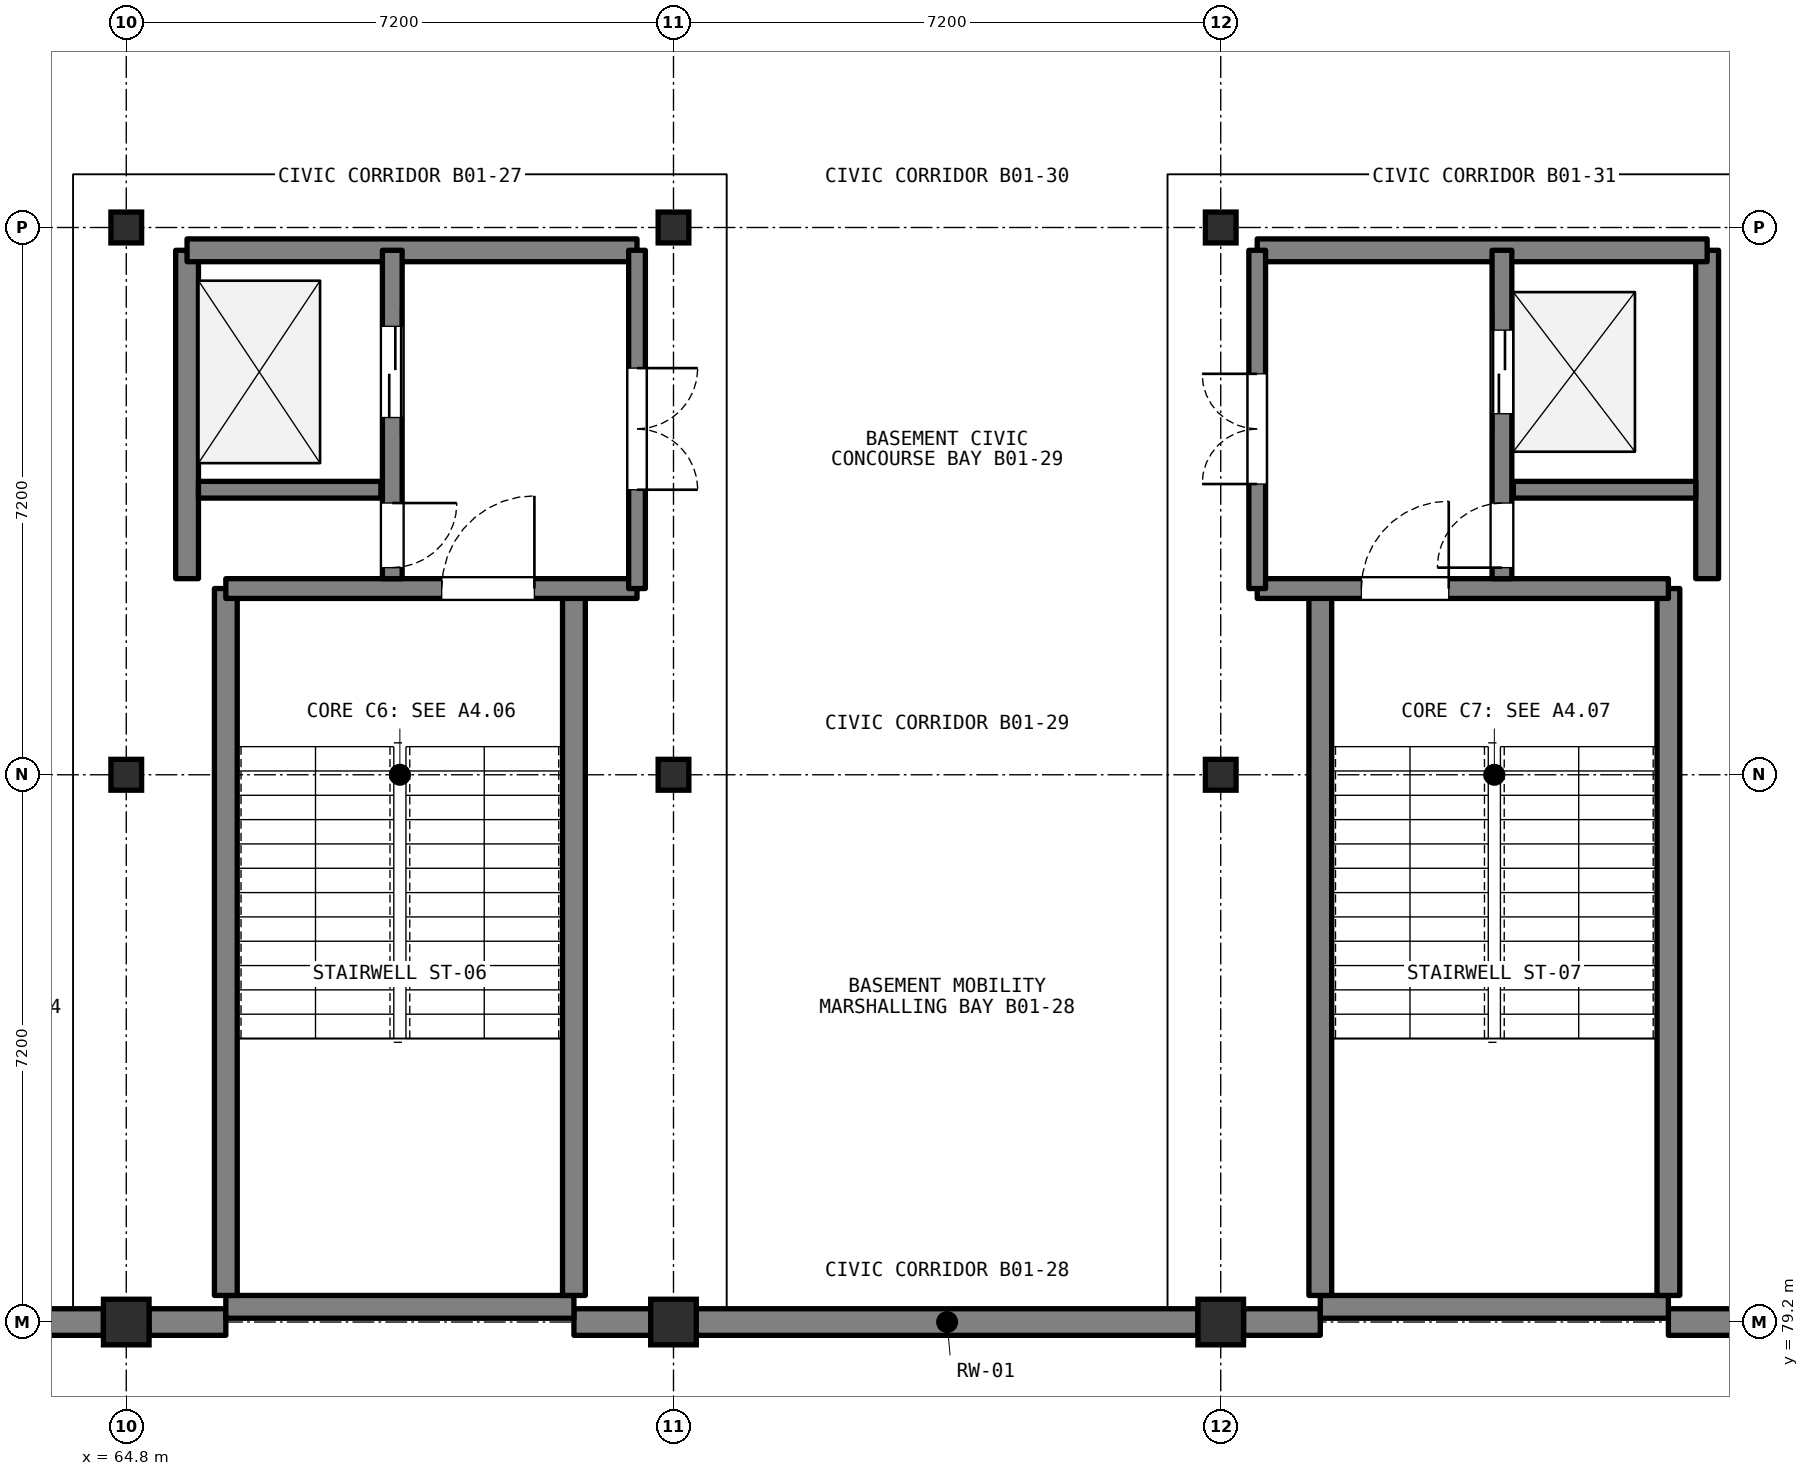
"""IFC4 building model, lengths in metres.
Left out: names, types, materials, properties, quantities, classifications, styles, units other than length and angle.
Written with IfcOpenShell. Run it as: python <this file> out.ifc"""

import sys

from ifc_helpers import new_model, si_unit, direction, frame, frame_2d, origin, origin_2d, place, context, subcontext, project, spatial, rectangle, i_section, extrude, element, fill, save


model = new_model("IFC4")
c1 = context("Model", 3, precision=1e-05, world=origin(), true_north=direction((0.0, 1.0)))
c2 = subcontext(c1, "Body", "Model", "MODEL_VIEW")
j1 = project(units=[si_unit("LENGTHUNIT", "METRE"), si_unit("PLANEANGLEUNIT", "RADIAN")], contexts=[c1])
p1 = place(None, origin())
s1 = spatial("IfcSite", under=j1, at=p1, CompositionType="ELEMENT")
p2 = place(p1, origin())
s2 = spatial("IfcBuilding", under=s1, at=p2, CompositionType="ELEMENT")
p3 = place(p2, frame((0.0, 0.0, -4.2)))
s3 = spatial("IfcBuildingStorey", under=s2, at=p3, CompositionType="ELEMENT", Elevation=-4.2)
p4 = place(p3, frame((57.9, 79.2, 0.0), z_axis=(0.0, 0.0, 1.0), x_axis=(1.0, 0.0, 0.0)))
e1 = element("IfcWall", 1, at=p4, inside=s3, PredefinedType="USERDEFINED", context=c2, shape_type="SweptSolid", body=[
    extrude(rectangle(XDim=6.6, YDim=0.35, at=frame_2d((3.3, 0.0))), origin(), (0.0, 0.0, 1.0), 3.98),
])
for number, where, z_axis, x_axis in (
    (2, (65.1, 79.2, 0.0), (0.0, 0.0, 1.0), (1.0, 0.0, 0.0)),
    (3, (70.69, 79.2, 0.0), (0.0, 0.0, 1.0), (1.0, 0.0, 0.0)),
):
    element("IfcWall", number, at=place(p3, frame(where, z_axis=z_axis, x_axis=x_axis)), inside=s3, PredefinedType="USERDEFINED", context=c2, shape_type="SweptSolid", body=[
        extrude(rectangle(XDim=1.01, YDim=0.35, at=frame_2d((0.505, 0.0))), origin(), (0.0, 0.0, 1.0), 3.98),
    ])
p5 = place(p3, frame((72.3, 79.2, 0.0), z_axis=(0.0, 0.0, 1.0), x_axis=(1.0, 0.0, 0.0)))
e4 = element("IfcWall", 4, at=p5, inside=s3, PredefinedType="USERDEFINED", context=c2, shape_type="SweptSolid", body=[
    extrude(rectangle(XDim=6.6, YDim=0.35, at=frame_2d((3.3, 0.0))), origin(), (0.0, 0.0, 1.0), 3.98),
])
for number, where, z_axis, x_axis in (
    (5, (79.5, 79.2, 0.0), (0.0, 0.0, 1.0), (1.0, 0.0, 0.0)),
    (6, (85.09, 79.2, 0.0), (0.0, 0.0, 1.0), (1.0, 0.0, 0.0)),
):
    element("IfcWall", number, at=place(p3, frame(where, z_axis=z_axis, x_axis=x_axis)), inside=s3, PredefinedType="USERDEFINED", context=c2, shape_type="SweptSolid", body=[
        extrude(rectangle(XDim=1.01, YDim=0.35, at=frame_2d((0.505, 0.0))), origin(), (0.0, 0.0, 1.0), 3.98),
    ])
p6 = place(p3, frame((64.8, 79.2, 0.0), z_axis=(0.0, 0.0, 1.0), x_axis=(1.0, 0.0, 0.0)))
e7 = element("IfcColumn", 7, at=p6, inside=s3, PredefinedType="COLUMN", context=c2, shape_type="SweptSolid", body=[
    extrude(rectangle(XDim=0.6, YDim=0.6, at=origin_2d()), origin(), (0.0, 0.0, 1.0), 4.2),
])
for number, where, z_axis, x_axis in (
    (8, (64.8, 86.4, 0.0), (0.0, 0.0, 1.0), (1.0, 0.0, 0.0)),
    (9, (64.8, 93.6, 0.0), (0.0, 0.0, 1.0), (1.0, 0.0, 0.0)),
):
    element("IfcColumn", number, at=place(p3, frame(where, z_axis=z_axis, x_axis=x_axis)), inside=s3, PredefinedType="COLUMN", context=c2, shape_type="SweptSolid", body=[
        extrude(i_section(OverallWidth=0.404, OverallDepth=0.406, WebThickness=0.027, FlangeThickness=0.044, FilletRadius=0.015, at=origin_2d()), origin(), (0.0, 0.0, 1.0), 4.2),
    ])
p7 = place(p3, frame((72.0, 79.2, 0.0), z_axis=(0.0, 0.0, 1.0), x_axis=(1.0, 0.0, 0.0)))
e10 = element("IfcColumn", 10, at=p7, inside=s3, PredefinedType="COLUMN", context=c2, shape_type="SweptSolid", body=[
    extrude(rectangle(XDim=0.6, YDim=0.6, at=origin_2d()), origin(), (0.0, 0.0, 1.0), 4.2),
])
for number, where, z_axis, x_axis in (
    (11, (72.0, 86.4, 0.0), (0.0, 0.0, 1.0), (1.0, 0.0, 0.0)),
    (12, (72.0, 93.6, 0.0), (0.0, 0.0, 1.0), (1.0, 0.0, 0.0)),
):
    element("IfcColumn", number, at=place(p3, frame(where, z_axis=z_axis, x_axis=x_axis)), inside=s3, PredefinedType="COLUMN", context=c2, shape_type="SweptSolid", body=[
        extrude(i_section(OverallWidth=0.404, OverallDepth=0.406, WebThickness=0.027, FlangeThickness=0.044, FilletRadius=0.015, at=origin_2d()), origin(), (0.0, 0.0, 1.0), 4.2),
    ])
p8 = place(p3, frame((79.2, 79.2, 0.0), z_axis=(0.0, 0.0, 1.0), x_axis=(1.0, 0.0, 0.0)))
e13 = element("IfcColumn", 13, at=p8, inside=s3, PredefinedType="COLUMN", context=c2, shape_type="SweptSolid", body=[
    extrude(rectangle(XDim=0.6, YDim=0.6, at=origin_2d()), origin(), (0.0, 0.0, 1.0), 4.2),
])
for number, where, z_axis, x_axis in (
    (14, (79.2, 86.4, 0.0), (0.0, 0.0, 1.0), (1.0, 0.0, 0.0)),
    (15, (79.2, 93.6, 0.0), (0.0, 0.0, 1.0), (1.0, 0.0, 0.0)),
):
    element("IfcColumn", number, at=place(p3, frame(where, z_axis=z_axis, x_axis=x_axis)), inside=s3, PredefinedType="COLUMN", context=c2, shape_type="SweptSolid", body=[
        extrude(i_section(OverallWidth=0.404, OverallDepth=0.406, WebThickness=0.027, FlangeThickness=0.044, FilletRadius=0.015, at=origin_2d()), origin(), (0.0, 0.0, 1.0), 4.2),
    ])
p9 = place(p3, frame((66.11, 79.4, 0.0), z_axis=(0.0, 0.0, 1.0), x_axis=(1.0, 0.0, 0.0)))
e16 = element("IfcWall", 16, at=p9, inside=s3, PredefinedType="SHEAR", context=c2, shape_type="SweptSolid", body=[
    extrude(rectangle(XDim=4.58, YDim=0.3, at=frame_2d((2.29, 0.0))), origin(), (0.0, 0.0, 1.0), 3.98),
])
for number, where, z_axis, x_axis in (
    (17, (66.11, 79.55, 0.0), (0.0, 0.0, 1.0), (0.0, 1.0, 0.0)),
    (18, (70.69, 79.55, 0.0), (0.0, 0.0, 1.0), (0.0, 1.0, 0.0)),
):
    element("IfcWall", number, at=place(p3, frame(where, z_axis=z_axis, x_axis=x_axis)), inside=s3, PredefinedType="SHEAR", context=c2, shape_type="SweptSolid", body=[
        extrude(rectangle(XDim=9.3, YDim=0.3, at=frame_2d((4.65, 0.0))), origin(), (0.0, 0.0, 1.0), 3.98),
    ])
p10 = place(p3, frame((66.11, 88.85, 0.0), z_axis=(0.0, 0.0, 1.0), x_axis=(1.0, 0.0, 0.0)))
e19 = element("IfcWall", 19, at=p10, inside=s3, PredefinedType="SHEAR", context=c2, shape_type="SweptSolid", body=[
    extrude(rectangle(XDim=5.41, YDim=0.26, at=frame_2d((2.705, 0.0))), origin(), (0.0, 0.0, 1.0), 3.98),
])
p11 = place(p10, frame((2.84, 0.0, 0.0)))
e20 = element("IfcOpeningElement", 20, at=p11, cuts=e19, PredefinedType="OPENING", context=c2, shape_type="SweptSolid", body=[
    extrude(rectangle(XDim=1.22, YDim=2.15, at=frame_2d((0.61, 1.075))), frame((0.0, 0.14, 0.0), z_axis=(0.0, -1.0, 0.0), x_axis=(1.0, 0.0, 0.0)), (0.0, 0.0, 1.0), 0.28),
])
p12 = place(p3, frame((65.6, 88.98, 0.0), z_axis=(0.0, 0.0, 1.0), x_axis=(0.0, 1.0, 0.0)))
e21 = element("IfcWall", 21, at=p12, inside=s3, PredefinedType="SHEAR", context=c2, shape_type="SweptSolid", body=[
    extrude(rectangle(XDim=4.32, YDim=0.3, at=frame_2d((2.16, 0.0))), origin(), (0.0, 0.0, 1.0), 3.98),
])
p13 = place(p3, frame((65.6, 93.3, 0.0), z_axis=(0.0, 0.0, 1.0), x_axis=(1.0, 0.0, 0.0)))
e22 = element("IfcWall", 22, at=p13, inside=s3, PredefinedType="SHEAR", context=c2, shape_type="SweptSolid", body=[
    extrude(rectangle(XDim=5.92, YDim=0.3, at=frame_2d((2.96, 0.0))), origin(), (0.0, 0.0, 1.0), 3.98),
])
p14 = place(p3, frame((65.75, 90.15, 0.0), z_axis=(0.0, 0.0, 1.0), x_axis=(1.0, 0.0, 0.0)))
e23 = element("IfcWall", 23, at=p14, inside=s3, PredefinedType="SHEAR", context=c2, shape_type="SweptSolid", body=[
    extrude(rectangle(XDim=2.4, YDim=0.22, at=frame_2d((1.2, 0.0))), origin(), (0.0, 0.0, 1.0), 3.98),
])
p15 = place(p3, frame((68.3, 93.3, 0.0), z_axis=(0.0, 0.0, 1.0), x_axis=(0.0, -1.0, 0.0)))
e24 = element("IfcWall", 24, at=p15, inside=s3, PredefinedType="SHEAR", context=c2, shape_type="SweptSolid", body=[
    extrude(rectangle(XDim=4.32, YDim=0.26, at=frame_2d((2.16, 0.0))), origin(), (0.0, 0.0, 1.0), 3.98),
])
p16 = place(p15, frame((1.0, 0.0, 0.0)))
e25 = element("IfcOpeningElement", 25, at=p16, cuts=e24, PredefinedType="OPENING", context=c2, shape_type="SweptSolid", body=[
    extrude(rectangle(XDim=1.2, YDim=2.15, at=frame_2d((0.6, 1.075))), frame((0.0, 0.14, 0.0), z_axis=(0.0, -1.0, 0.0), x_axis=(1.0, 0.0, 0.0)), (0.0, 0.0, 1.0), 0.28),
])
p17 = place(p15, frame((3.325, 0.0, 0.0)))
e26 = element("IfcOpeningElement", 26, at=p17, cuts=e24, PredefinedType="OPENING", context=c2, shape_type="SweptSolid", body=[
    extrude(rectangle(XDim=0.85, YDim=2.05, at=frame_2d((0.425, 1.025))), frame((0.0, 0.14, 0.0), z_axis=(0.0, -1.0, 0.0), x_axis=(1.0, 0.0, 0.0)), (0.0, 0.0, 1.0), 0.28),
])
p18 = place(p3, frame((71.52, 93.3, 0.0), z_axis=(0.0, 0.0, 1.0), x_axis=(0.0, -1.0, 0.0)))
e27 = element("IfcWall", 27, at=p18, inside=s3, PredefinedType="SHEAR", context=c2, shape_type="SweptSolid", body=[
    extrude(rectangle(XDim=4.45, YDim=0.22, at=frame_2d((2.225, 0.0))), origin(), (0.0, 0.0, 1.0), 3.98),
])
p19 = place(p18, frame((1.55, 0.0, 0.0)))
e28 = element("IfcOpeningElement", 28, at=p19, cuts=e27, PredefinedType="OPENING", context=c2, shape_type="SweptSolid", body=[
    extrude(rectangle(XDim=1.6, YDim=2.2, at=frame_2d((0.8, 1.1))), frame((0.0, 0.12, 0.0), z_axis=(0.0, -1.0, 0.0), x_axis=(1.0, 0.0, 0.0)), (0.0, 0.0, 1.0), 0.24),
])
p20 = place(p3, frame((80.51, 79.4, 0.0), z_axis=(0.0, 0.0, 1.0), x_axis=(1.0, 0.0, 0.0)))
e29 = element("IfcWall", 29, at=p20, inside=s3, PredefinedType="SHEAR", context=c2, shape_type="SweptSolid", body=[
    extrude(rectangle(XDim=4.58, YDim=0.3, at=frame_2d((2.29, 0.0))), origin(), (0.0, 0.0, 1.0), 3.98),
])
for number, where, z_axis, x_axis in (
    (30, (80.51, 79.55, 0.0), (0.0, 0.0, 1.0), (0.0, 1.0, 0.0)),
    (31, (85.09, 79.55, 0.0), (0.0, 0.0, 1.0), (0.0, 1.0, 0.0)),
):
    element("IfcWall", number, at=place(p3, frame(where, z_axis=z_axis, x_axis=x_axis)), inside=s3, PredefinedType="SHEAR", context=c2, shape_type="SweptSolid", body=[
        extrude(rectangle(XDim=9.3, YDim=0.3, at=frame_2d((4.65, 0.0))), origin(), (0.0, 0.0, 1.0), 3.98),
    ])
p21 = place(p3, frame((79.68, 88.85, 0.0), z_axis=(0.0, 0.0, 1.0), x_axis=(1.0, 0.0, 0.0)))
e32 = element("IfcWall", 32, at=p21, inside=s3, PredefinedType="SHEAR", context=c2, shape_type="SweptSolid", body=[
    extrude(rectangle(XDim=5.41, YDim=0.26, at=frame_2d((2.705, 0.0))), origin(), (0.0, 0.0, 1.0), 3.98),
])
p22 = place(p21, frame((1.37, 0.0, 0.0)))
e33 = element("IfcOpeningElement", 33, at=p22, cuts=e32, PredefinedType="OPENING", context=c2, shape_type="SweptSolid", body=[
    extrude(rectangle(XDim=1.15, YDim=2.15, at=frame_2d((0.575, 1.075))), frame((0.0, 0.14, 0.0), z_axis=(0.0, -1.0, 0.0), x_axis=(1.0, 0.0, 0.0)), (0.0, 0.0, 1.0), 0.28),
])
p23 = place(p3, frame((85.6, 88.98, 0.0), z_axis=(0.0, 0.0, 1.0), x_axis=(0.0, 1.0, 0.0)))
e34 = element("IfcWall", 34, at=p23, inside=s3, PredefinedType="SHEAR", context=c2, shape_type="SweptSolid", body=[
    extrude(rectangle(XDim=4.32, YDim=0.3, at=frame_2d((2.16, 0.0))), origin(), (0.0, 0.0, 1.0), 3.98),
])
p24 = place(p3, frame((79.68, 93.3, 0.0), z_axis=(0.0, 0.0, 1.0), x_axis=(1.0, 0.0, 0.0)))
e35 = element("IfcWall", 35, at=p24, inside=s3, PredefinedType="SHEAR", context=c2, shape_type="SweptSolid", body=[
    extrude(rectangle(XDim=5.92, YDim=0.3, at=frame_2d((2.96, 0.0))), origin(), (0.0, 0.0, 1.0), 3.98),
])
p25 = place(p3, frame((83.05, 90.15, 0.0), z_axis=(0.0, 0.0, 1.0), x_axis=(1.0, 0.0, 0.0)))
e36 = element("IfcWall", 36, at=p25, inside=s3, PredefinedType="SHEAR", context=c2, shape_type="SweptSolid", body=[
    extrude(rectangle(XDim=2.4, YDim=0.22, at=frame_2d((1.2, 0.0))), origin(), (0.0, 0.0, 1.0), 3.98),
])
p26 = place(p3, frame((82.9, 88.98, 0.0), z_axis=(0.0, 0.0, 1.0), x_axis=(0.0, 1.0, 0.0)))
e37 = element("IfcWall", 37, at=p26, inside=s3, PredefinedType="SHEAR", context=c2, shape_type="SweptSolid", body=[
    extrude(rectangle(XDim=4.32, YDim=0.26, at=frame_2d((2.16, 0.0))), origin(), (0.0, 0.0, 1.0), 3.98),
])
p27 = place(p26, frame((2.17, 0.0, 0.0)))
e38 = element("IfcOpeningElement", 38, at=p27, cuts=e37, PredefinedType="OPENING", context=c2, shape_type="SweptSolid", body=[
    extrude(rectangle(XDim=1.1, YDim=2.15, at=frame_2d((0.55, 1.075))), frame((0.0, 0.14, 0.0), z_axis=(0.0, -1.0, 0.0), x_axis=(1.0, 0.0, 0.0)), (0.0, 0.0, 1.0), 0.28),
])
p28 = place(p26, frame((0.145, 0.0, 0.0)))
e39 = element("IfcOpeningElement", 39, at=p28, cuts=e37, PredefinedType="OPENING", context=c2, shape_type="SweptSolid", body=[
    extrude(rectangle(XDim=0.85, YDim=2.05, at=frame_2d((0.425, 1.025))), frame((0.0, 0.14, 0.0), z_axis=(0.0, -1.0, 0.0), x_axis=(1.0, 0.0, 0.0)), (0.0, 0.0, 1.0), 0.28),
])
p29 = place(p3, frame((79.68, 88.85, 0.0), z_axis=(0.0, 0.0, 1.0), x_axis=(0.0, 1.0, 0.0)))
e40 = element("IfcWall", 40, at=p29, inside=s3, PredefinedType="SHEAR", context=c2, shape_type="SweptSolid", body=[
    extrude(rectangle(XDim=4.45, YDim=0.22, at=frame_2d((2.225, 0.0))), origin(), (0.0, 0.0, 1.0), 3.98),
])
p30 = place(p29, frame((1.375, 0.0, 0.0)))
e41 = element("IfcOpeningElement", 41, at=p30, cuts=e40, PredefinedType="OPENING", context=c2, shape_type="SweptSolid", body=[
    extrude(rectangle(XDim=1.45, YDim=2.2, at=frame_2d((0.725, 1.1))), frame((0.0, 0.12, 0.0), z_axis=(0.0, -1.0, 0.0), x_axis=(1.0, 0.0, 0.0)), (0.0, 0.0, 1.0), 0.24),
])
p31 = place(p11, origin())
e42 = element("IfcDoor", 42, at=p31, inside=s3, OperationType="SINGLE_SWING_RIGHT", PredefinedType="DOOR", context=c2, shape_type="SweptSolid", body=[
    extrude(rectangle(XDim=1.22, YDim=2.15, at=frame_2d((0.61, 1.075))), frame((0.0, 0.025, 0.0), z_axis=(0.0, -1.0, 0.0), x_axis=(1.0, 0.0, 0.0)), (0.0, 0.0, 1.0), 0.05),
])
fill(e20, e42)
p32 = place(p16, origin())
e43 = element("IfcDoor", 43, at=p32, inside=s3, OperationType="DOUBLE_DOOR_SLIDING", PredefinedType="DOOR", context=c2, shape_type="SweptSolid", body=[
    extrude(rectangle(XDim=1.2, YDim=2.15, at=frame_2d((0.6, 1.075))), frame((0.0, 0.025, 0.0), z_axis=(0.0, -1.0, 0.0), x_axis=(1.0, 0.0, 0.0)), (0.0, 0.0, 1.0), 0.05),
])
fill(e25, e43)
p33 = place(p17, origin())
e44 = element("IfcDoor", 44, at=p33, inside=s3, OperationType="SINGLE_SWING_LEFT", PredefinedType="DOOR", context=c2, shape_type="SweptSolid", body=[
    extrude(rectangle(XDim=0.85, YDim=2.05, at=frame_2d((0.425, 1.025))), frame((0.0, 0.025, 0.0), z_axis=(0.0, -1.0, 0.0), x_axis=(1.0, 0.0, 0.0)), (0.0, 0.0, 1.0), 0.05),
])
fill(e26, e44)
p34 = place(p19, origin())
e45 = element("IfcDoor", 45, at=p34, inside=s3, OperationType="DOUBLE_DOOR_SINGLE_SWING", PredefinedType="DOOR", context=c2, shape_type="SweptSolid", body=[
    extrude(rectangle(XDim=1.6, YDim=2.2, at=frame_2d((0.8, 1.1))), frame((0.0, 0.025, 0.0), z_axis=(0.0, -1.0, 0.0), x_axis=(1.0, 0.0, 0.0)), (0.0, 0.0, 1.0), 0.05),
])
fill(e28, e45)
p35 = place(p22, origin())
e46 = element("IfcDoor", 46, at=p35, inside=s3, OperationType="SINGLE_SWING_RIGHT", PredefinedType="DOOR", context=c2, shape_type="SweptSolid", body=[
    extrude(rectangle(XDim=1.15, YDim=2.15, at=frame_2d((0.575, 1.075))), frame((0.0, 0.025, 0.0), z_axis=(0.0, -1.0, 0.0), x_axis=(1.0, 0.0, 0.0)), (0.0, 0.0, 1.0), 0.05),
])
fill(e33, e46)
p36 = place(p27, origin())
e47 = element("IfcDoor", 47, at=p36, inside=s3, OperationType="DOUBLE_DOOR_SLIDING", PredefinedType="DOOR", context=c2, shape_type="SweptSolid", body=[
    extrude(rectangle(XDim=1.1, YDim=2.15, at=frame_2d((0.55, 1.075))), frame((0.0, 0.025, 0.0), z_axis=(0.0, -1.0, 0.0), x_axis=(1.0, 0.0, 0.0)), (0.0, 0.0, 1.0), 0.05),
])
fill(e38, e47)
p37 = place(p28, origin())
e48 = element("IfcDoor", 48, at=p37, inside=s3, OperationType="SINGLE_SWING_LEFT", PredefinedType="DOOR", context=c2, shape_type="SweptSolid", body=[
    extrude(rectangle(XDim=0.85, YDim=2.05, at=frame_2d((0.425, 1.025))), frame((0.0, 0.025, 0.0), z_axis=(0.0, -1.0, 0.0), x_axis=(1.0, 0.0, 0.0)), (0.0, 0.0, 1.0), 0.05),
])
fill(e39, e48)
p38 = place(p30, origin())
e49 = element("IfcDoor", 49, at=p38, inside=s3, OperationType="DOUBLE_DOOR_SINGLE_SWING", PredefinedType="DOOR", context=c2, shape_type="SweptSolid", body=[
    extrude(rectangle(XDim=1.45, YDim=2.2, at=frame_2d((0.725, 1.1))), frame((0.0, 0.025, 0.0), z_axis=(0.0, -1.0, 0.0), x_axis=(1.0, 0.0, 0.0)), (0.0, 0.0, 1.0), 0.05),
])
fill(e41, e49)
save(model, sys.argv[1])
